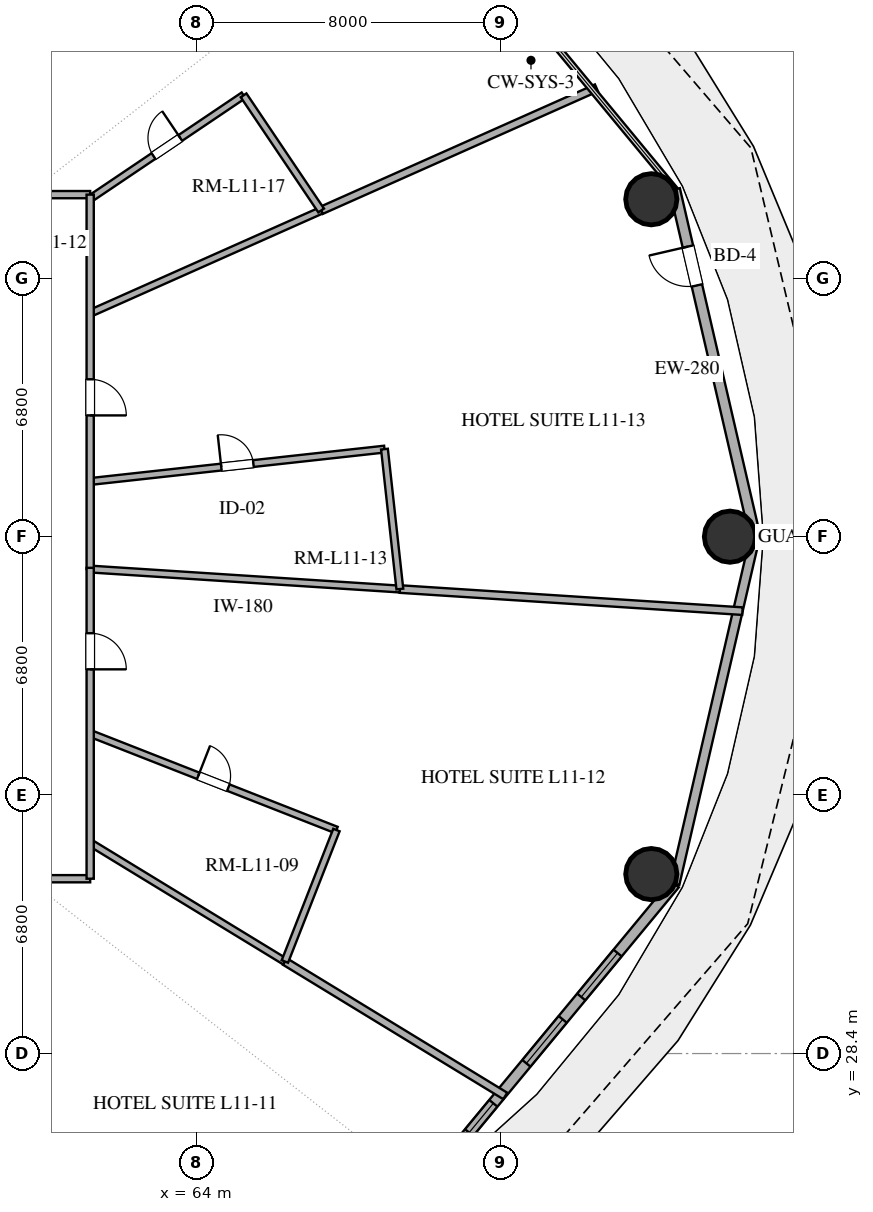
"""IFC4 building model, lengths in metres.
Left out: names, types, materials, properties, quantities, classifications, styles, units other than length and angle.
Written with IfcOpenShell. Run it as: python <this file> out.ifc"""

import sys

from ifc_helpers import new_model, si_unit, direction, frame, frame_2d, origin, origin_2d, place, context, subcontext, project, spatial, rectangle, hollow_circle, extrude, element, fill, save


model = new_model("IFC4")
c1 = context("Model", 3, precision=1e-05, world=origin(), true_north=direction((0.0, 1.0)))
c2 = subcontext(c1, "Body", "Model", "MODEL_VIEW")
j1 = project(units=[si_unit("LENGTHUNIT", "METRE"), si_unit("PLANEANGLEUNIT", "RADIAN")], contexts=[c1])
p1 = place(None, origin())
s1 = spatial("IfcSite", under=j1, at=p1, CompositionType="ELEMENT")
p2 = place(p1, origin())
s2 = spatial("IfcBuilding", under=s1, at=p2, CompositionType="ELEMENT")
p3 = place(p2, frame((0.0, 0.0, 49.8)))
s3 = spatial("IfcBuildingStorey", under=s2, at=p3, CompositionType="ELEMENT", Elevation=49.8)
for number, where, z_axis, x_axis in (
    (1, (78.035, 42.0, 0.0), (0.0, 0.0, 1.0), (1.0, 0.0, 0.0)),
    (2, (75.966, 50.878, 0.0), (0.0, 0.0, 1.0), (1.0, 0.0, 0.0)),
    (3, (75.966, 33.122, 0.0), (0.0, 0.0, 1.0), (1.0, 0.0, 0.0)),
):
    element("IfcColumn", number, at=place(p3, frame(where, z_axis=z_axis, x_axis=x_axis)), inside=s3, PredefinedType="COLUMN", context=c2, shape_type="SweptSolid", body=[
        extrude(hollow_circle(Radius=0.675, WallThickness=0.036, at=origin_2d()), origin(), (0.0, 0.0, 1.0), 3.38),
    ])
p4 = place(p3, frame((78.696, 42.0, 0.0), z_axis=(0.0, 0.0, 1.0), x_axis=(-0.225454452941, 0.974253709076, 0.0)))
e4 = element("IfcWall", 4, at=p4, inside=s3, PredefinedType="SOLIDWALL", context=c2, shape_type="SweptSolid", body=[
    extrude(rectangle(XDim=9.38, YDim=0.28, at=frame_2d((4.69, 0.0))), origin(), (0.0, 0.0, 1.0), 3.38),
])
p5 = place(p4, frame((6.785, 0.0, 0.0)))
e5 = element("IfcOpeningElement", 5, at=p5, cuts=e4, PredefinedType="OPENING", context=c2, shape_type="SweptSolid", body=[
    extrude(rectangle(XDim=1.05, YDim=2.2, at=frame_2d((0.525, 1.1))), frame((0.0, 0.15, 0.0), z_axis=(0.0, -1.0, 0.0), x_axis=(1.0, 0.0, 0.0)), (0.0, 0.0, 1.0), 0.3),
])
p6 = place(p3, frame((70.174, 25.114, 0.0), z_axis=(0.0, 0.0, 1.0), x_axis=(0.637296809613, 0.770618437657, 0.0)))
e6 = element("IfcWall", 6, at=p6, inside=s3, PredefinedType="SOLIDWALL", context=c2, shape_type="SweptSolid", body=[
    extrude(rectangle(XDim=10.053, YDim=0.28, at=frame_2d((5.027, 0.0))), origin(), (0.0, 0.0, 1.0), 3.38),
])
p7 = place(p6, frame((1.565, 0.0, 0.85)))
e7 = element("IfcOpeningElement", 7, at=p7, cuts=e6, PredefinedType="OPENING", context=c2, shape_type="SweptSolid", body=[
    extrude(rectangle(XDim=1.0, YDim=1.8, at=frame_2d((0.5, 0.9))), frame((0.0, 0.15, 0.0), z_axis=(0.0, -1.0, 0.0), x_axis=(1.0, 0.0, 0.0)), (0.0, 0.0, 1.0), 0.3),
])
p8 = place(p6, frame((3.93, 0.0, 0.85)))
e8 = element("IfcOpeningElement", 8, at=p8, cuts=e6, PredefinedType="OPENING", context=c2, shape_type="SweptSolid", body=[
    extrude(rectangle(XDim=1.5, YDim=2.0, at=frame_2d((0.75, 1.0))), frame((0.0, 0.15, 0.0), z_axis=(0.0, -1.0, 0.0), x_axis=(1.0, 0.0, 0.0)), (0.0, 0.0, 1.0), 0.3),
])
p9 = place(p6, frame((6.196, 0.0, 0.85)))
e9 = element("IfcOpeningElement", 9, at=p9, cuts=e6, PredefinedType="OPENING", context=c2, shape_type="SweptSolid", body=[
    extrude(rectangle(XDim=1.5, YDim=2.0, at=frame_2d((0.75, 1.0))), frame((0.0, 0.15, 0.0), z_axis=(0.0, -1.0, 0.0), x_axis=(1.0, 0.0, 0.0)), (0.0, 0.0, 1.0), 0.3),
])
p10 = place(p3, frame((76.581, 32.862, 0.0), z_axis=(0.0, 0.0, 1.0), x_axis=(0.225454452941, 0.974253709076, 0.0)))
e10 = element("IfcWall", 10, at=p10, inside=s3, PredefinedType="SOLIDWALL", context=c2, shape_type="SweptSolid", body=[
    extrude(rectangle(XDim=9.38, YDim=0.25, at=frame_2d((4.69, 0.0))), origin(), (0.0, 0.0, 1.0), 3.38),
])
p11 = place(p3, frame((63.96, 62.204, 0.0), z_axis=(0.0, 0.0, 1.0), x_axis=(-0.619889304847, -0.784689269543, 0.0)))
e11 = element("IfcWall", 11, at=p11, inside=s3, PredefinedType="PARTITIONING", context=c2, shape_type="SweptSolid", body=[
    extrude(rectangle(XDim=14.278, YDim=0.2, at=frame_2d((7.139, 0.0))), origin(), (0.0, 0.0, 1.0), 2.74),
])
p12 = place(p3, frame((78.364, 40.041, 0.0), z_axis=(0.0, 0.0, 1.0), x_axis=(-0.997924020497, 0.064402246198, 0.0)))
e12 = element("IfcWall", 12, at=p12, inside=s3, PredefinedType="PARTITIONING", context=c2, shape_type="SweptSolid", body=[
    extrude(rectangle(XDim=9.034, YDim=0.2, at=frame_2d((4.517, 0.0))), origin(), (0.0, 0.0, 1.0), 2.74),
])
p13 = place(p3, frame((69.349, 40.622, 0.0), z_axis=(0.0, 0.0, 1.0), x_axis=(-0.997924317455, 0.064397644621, 0.0)))
e13 = element("IfcWall", 13, at=p13, inside=s3, PredefinedType="PLUMBINGWALL", context=c2, shape_type="SweptSolid", body=[
    extrude(rectangle(XDim=8.166, YDim=0.18, at=frame_2d((4.083, 0.0))), origin(), (0.0, 0.0, 1.0), 2.74),
])
p14 = place(p3, frame((74.523, 53.809, 0.0), z_axis=(0.0, 0.0, 1.0), x_axis=(-0.913542208968, -0.40674393964, 0.0)))
e14 = element("IfcWall", 14, at=p14, inside=s3, PredefinedType="PARTITIONING", context=c2, shape_type="SweptSolid", body=[
    extrude(rectangle(XDim=7.93, YDim=0.2, at=frame_2d((3.965, 0.0))), origin(), (0.0, 0.0, 1.0), 2.74),
])
p15 = place(p3, frame((61.2, 43.452, 0.0), z_axis=(0.0, 0.0, 1.0), x_axis=(0.994005037085, 0.109334286708, 0.0)))
e15 = element("IfcWall", 15, at=p15, inside=s3, PredefinedType="PLUMBINGWALL", context=c2, shape_type="SweptSolid", body=[
    extrude(rectangle(XDim=7.791, YDim=0.18, at=frame_2d((3.896, 0.0))), origin(), (0.0, 0.0, 1.0), 2.74),
])
p16 = place(p15, frame((3.47, 0.0, 0.0)))
e16 = element("IfcOpeningElement", 16, at=p16, cuts=e15, PredefinedType="OPENING", context=c2, shape_type="SweptSolid", body=[
    extrude(rectangle(XDim=0.85, YDim=2.1, at=frame_2d((0.425, 1.05))), frame((0.0, 0.1, 0.0), z_axis=(0.0, -1.0, 0.0), x_axis=(1.0, 0.0, 0.0)), (0.0, 0.0, 1.0), 0.2),
])
p17 = place(p3, frame((61.01, 20.281, 0.0), z_axis=(0.0, 0.0, 1.0), x_axis=(-0.513892719639, 0.857854458928, 0.0)))
e17 = element("IfcWall", 17, at=p17, inside=s3, PredefinedType="PARTITIONING", context=c2, shape_type="SweptSolid", body=[
    extrude(rectangle(XDim=7.563, YDim=0.2, at=frame_2d((3.781, 0.0))), origin(), (0.0, 0.0, 1.0), 2.74),
])
p18 = place(p3, frame((61.2, 36.823, 0.0), z_axis=(0.0, 0.0, 1.0), x_axis=(0.930954264603, -0.365135806539, 0.0)))
e18 = element("IfcWall", 18, at=p18, inside=s3, PredefinedType="PLUMBINGWALL", context=c2, shape_type="SweptSolid", body=[
    extrude(rectangle(XDim=6.961, YDim=0.18, at=frame_2d((3.48, 0.0))), origin(), (0.0, 0.0, 1.0), 2.74),
])
p19 = place(p18, frame((3.055, 0.0, 0.0)))
e19 = element("IfcOpeningElement", 19, at=p19, cuts=e18, PredefinedType="OPENING", context=c2, shape_type="SweptSolid", body=[
    extrude(rectangle(XDim=0.85, YDim=2.1, at=frame_2d((0.425, 1.05))), frame((0.0, 0.1, 0.0), z_axis=(0.0, -1.0, 0.0), x_axis=(1.0, 0.0, 0.0)), (0.0, 0.0, 1.0), 0.2),
])
p20 = place(p3, frame((72.123, 27.284, 0.0), z_axis=(0.0, 0.0, 1.0), x_axis=(-0.853686673388, 0.520786965735, 0.0)))
e20 = element("IfcWall", 20, at=p20, inside=s3, PredefinedType="PARTITIONING", context=c2, shape_type="SweptSolid", body=[
    extrude(rectangle(XDim=6.793, YDim=0.2, at=frame_2d((3.396, 0.0))), origin(), (0.0, 0.0, 1.0), 2.74),
])
p21 = place(p3, frame((67.278, 50.583, 0.0), z_axis=(0.0, 0.0, 1.0), x_axis=(-0.913551093465, -0.406723984575, 0.0)))
e21 = element("IfcWall", 21, at=p21, inside=s3, PredefinedType="PLUMBINGWALL", context=c2, shape_type="SweptSolid", body=[
    extrude(rectangle(XDim=6.653, YDim=0.18, at=frame_2d((3.327, 0.0))), origin(), (0.0, 0.0, 1.0), 2.74),
])
p22 = place(p3, frame((43.369, 51.0, 0.0), z_axis=(0.0, 0.0, 1.0), x_axis=(1.0, 0.0, 0.0)))
e22 = element("IfcWall", 22, at=p22, inside=s3, PredefinedType="PARTITIONING", context=c2, shape_type="SweptSolid", body=[
    extrude(rectangle(XDim=17.831, YDim=0.19, at=frame_2d((8.916, 0.0))), origin(), (0.0, 0.0, 1.0), 2.74),
])
p23 = place(p22, frame((14.29, 0.0, 0.0)))
e23 = element("IfcOpeningElement", 23, at=p23, cuts=e22, PredefinedType="OPENING", context=c2, shape_type="SweptSolid", body=[
    extrude(rectangle(XDim=0.95, YDim=2.15, at=frame_2d((0.475, 1.075))), frame((0.0, 0.105, 0.0), z_axis=(0.0, -1.0, 0.0), x_axis=(1.0, 0.0, 0.0)), (0.0, 0.0, 1.0), 0.21),
])
p24 = place(p22, frame((8.533, 0.0, 0.0)))
e24 = element("IfcOpeningElement", 24, at=p24, cuts=e22, PredefinedType="OPENING", context=c2, shape_type="SweptSolid", body=[
    extrude(rectangle(XDim=1.0, YDim=2.2, at=frame_2d((0.5, 1.1))), frame((0.0, 0.105, 0.0), z_axis=(0.0, -1.0, 0.0), x_axis=(1.0, 0.0, 0.0)), (0.0, 0.0, 1.0), 0.21),
])
p25 = place(p22, frame((3.591, 0.0, 0.0)))
e25 = element("IfcOpeningElement", 25, at=p25, cuts=e22, PredefinedType="OPENING", context=c2, shape_type="SweptSolid", body=[
    extrude(rectangle(XDim=1.0, YDim=2.2, at=frame_2d((0.5, 1.1))), frame((0.0, 0.105, 0.0), z_axis=(0.0, -1.0, 0.0), x_axis=(1.0, 0.0, 0.0)), (0.0, 0.0, 1.0), 0.21),
])
p26 = place(p3, frame((66.323, 30.822, 0.0), z_axis=(0.0, 0.0, 1.0), x_axis=(-0.853693843866, 0.52077521153, 0.0)))
e26 = element("IfcWall", 26, at=p26, inside=s3, PredefinedType="PLUMBINGWALL", context=c2, shape_type="SweptSolid", body=[
    extrude(rectangle(XDim=6.002, YDim=0.18, at=frame_2d((3.001, 0.0))), origin(), (0.0, 0.0, 1.0), 2.74),
])
p27 = place(p3, frame((61.2, 33.0, 0.0), z_axis=(0.0, 0.0, 1.0), x_axis=(-1.0, 0.0, 0.0)))
e27 = element("IfcWall", 27, at=p27, inside=s3, PredefinedType="PARTITIONING", context=c2, shape_type="SweptSolid", body=[
    extrude(rectangle(XDim=7.846, YDim=0.19, at=frame_2d((3.923, 0.0))), origin(), (0.0, 0.0, 1.0), 2.74),
])
p28 = place(p27, frame((2.249, 0.0, 0.0)))
e28 = element("IfcOpeningElement", 28, at=p28, cuts=e27, PredefinedType="OPENING", context=c2, shape_type="SweptSolid", body=[
    extrude(rectangle(XDim=0.95, YDim=2.15, at=frame_2d((0.475, 1.075))), frame((0.0, 0.105, 0.0), z_axis=(0.0, -1.0, 0.0), x_axis=(1.0, 0.0, 0.0)), (0.0, 0.0, 1.0), 0.21),
])
p29 = place(p3, frame((61.2, 50.893, 0.0), z_axis=(0.0, 0.0, 1.0), x_axis=(0.829362933151, 0.558710233587, 0.0)))
e29 = element("IfcWall", 29, at=p29, inside=s3, PredefinedType="PLUMBINGWALL", context=c2, shape_type="SweptSolid", body=[
    extrude(rectangle(XDim=4.867, YDim=0.18, at=frame_2d((2.434, 0.0))), origin(), (0.0, 0.0, 1.0), 2.74),
])
p30 = place(p29, frame((2.009, 0.0, 0.0)))
e30 = element("IfcOpeningElement", 30, at=p30, cuts=e29, PredefinedType="OPENING", context=c2, shape_type="SweptSolid", body=[
    extrude(rectangle(XDim=0.85, YDim=2.1, at=frame_2d((0.425, 1.05))), frame((0.0, 0.1, 0.0), z_axis=(0.0, -1.0, 0.0), x_axis=(1.0, 0.0, 0.0)), (0.0, 0.0, 1.0), 0.2),
])
p31 = place(p3, frame((61.2, 51.0, 0.0), z_axis=(0.0, 0.0, 1.0), x_axis=(0.0, -1.0, 0.0)))
e31 = element("IfcWall", 31, at=p31, inside=s3, PredefinedType="PARTITIONING", context=c2, shape_type="SweptSolid", body=[
    extrude(rectangle(XDim=9.852, YDim=0.19, at=frame_2d((4.926, 0.0))), origin(), (0.0, 0.0, 1.0), 2.74),
])
p32 = place(p31, frame((4.859, 0.0, 0.0)))
e32 = element("IfcOpeningElement", 32, at=p32, cuts=e31, PredefinedType="OPENING", context=c2, shape_type="SweptSolid", body=[
    extrude(rectangle(XDim=0.95, YDim=2.15, at=frame_2d((0.475, 1.075))), frame((0.0, 0.105, 0.0), z_axis=(0.0, -1.0, 0.0), x_axis=(1.0, 0.0, 0.0)), (0.0, 0.0, 1.0), 0.21),
])
p33 = place(p3, frame((61.2, 41.18, 0.0), z_axis=(0.0, 0.0, 1.0), x_axis=(0.0, -1.0, 0.0)))
e33 = element("IfcWall", 33, at=p33, inside=s3, PredefinedType="PARTITIONING", context=c2, shape_type="SweptSolid", body=[
    extrude(rectangle(XDim=8.18, YDim=0.19, at=frame_2d((4.09, 0.0))), origin(), (0.0, 0.0, 1.0), 2.74),
])
p34 = place(p33, frame((1.721, 0.0, 0.0)))
e34 = element("IfcOpeningElement", 34, at=p34, cuts=e33, PredefinedType="OPENING", context=c2, shape_type="SweptSolid", body=[
    extrude(rectangle(XDim=0.95, YDim=2.15, at=frame_2d((0.475, 1.075))), frame((0.0, 0.105, 0.0), z_axis=(0.0, -1.0, 0.0), x_axis=(1.0, 0.0, 0.0)), (0.0, 0.0, 1.0), 0.21),
])
p35 = place(p3, frame((67.68, 34.281, 0.0), z_axis=(0.0, 0.0, 1.0), x_axis=(-0.365174619735, -0.930939040486, 0.0)))
e35 = element("IfcWall", 35, at=p35, inside=s3, PredefinedType="PLUMBINGWALL", context=c2, shape_type="SweptSolid", body=[
    extrude(rectangle(XDim=3.716, YDim=0.18, at=frame_2d((1.858, 0.0))), origin(), (0.0, 0.0, 1.0), 2.74),
])
p36 = place(p3, frame((68.944, 44.304, 0.0), z_axis=(0.0, 0.0, 1.0), x_axis=(0.109360669908, -0.994002134745, 0.0)))
e36 = element("IfcWall", 36, at=p36, inside=s3, PredefinedType="PLUMBINGWALL", context=c2, shape_type="SweptSolid", body=[
    extrude(rectangle(XDim=3.704, YDim=0.18, at=frame_2d((1.852, 0.0))), origin(), (0.0, 0.0, 1.0), 2.74),
])
p37 = place(p3, frame((65.237, 53.613, 0.0), z_axis=(0.0, 0.0, 1.0), x_axis=(0.558749555988, -0.829336441791, 0.0)))
e37 = element("IfcWall", 37, at=p37, inside=s3, PredefinedType="PLUMBINGWALL", context=c2, shape_type="SweptSolid", body=[
    extrude(rectangle(XDim=3.653, YDim=0.18, at=frame_2d((1.827, 0.0))), origin(), (0.0, 0.0, 1.0), 2.74),
])
p38 = place(p5, origin())
e38 = element("IfcDoor", 38, at=p38, inside=s3, OperationType="SINGLE_SWING_RIGHT", PredefinedType="DOOR", context=c2, shape_type="SweptSolid", body=[
    extrude(rectangle(XDim=1.05, YDim=2.2, at=frame_2d((0.525, 1.1))), frame((0.0, 0.025, 0.0), z_axis=(0.0, -1.0, 0.0), x_axis=(1.0, 0.0, 0.0)), (0.0, 0.0, 1.0), 0.05),
])
fill(e5, e38)
p39 = place(p7, origin())
e39 = element("IfcWindow", 39, at=p39, inside=s3, PartitioningType="SINGLE_PANEL", PredefinedType="WINDOW", context=c2, shape_type="SweptSolid", body=[
    extrude(rectangle(XDim=1.0, YDim=1.8, at=frame_2d((0.5, 0.9))), frame((0.0, 0.03, 0.0), z_axis=(0.0, -1.0, 0.0), x_axis=(1.0, 0.0, 0.0)), (0.0, 0.0, 1.0), 0.06),
])
fill(e7, e39)
p40 = place(p8, origin())
e40 = element("IfcWindow", 40, at=p40, inside=s3, PartitioningType="SINGLE_PANEL", PredefinedType="WINDOW", context=c2, shape_type="SweptSolid", body=[
    extrude(rectangle(XDim=1.5, YDim=2.0, at=frame_2d((0.75, 1.0))), frame((0.0, 0.03, 0.0), z_axis=(0.0, -1.0, 0.0), x_axis=(1.0, 0.0, 0.0)), (0.0, 0.0, 1.0), 0.06),
])
fill(e8, e40)
p41 = place(p9, origin())
e41 = element("IfcWindow", 41, at=p41, inside=s3, PartitioningType="SINGLE_PANEL", PredefinedType="WINDOW", context=c2, shape_type="SweptSolid", body=[
    extrude(rectangle(XDim=1.5, YDim=2.0, at=frame_2d((0.75, 1.0))), frame((0.0, 0.03, 0.0), z_axis=(0.0, -1.0, 0.0), x_axis=(1.0, 0.0, 0.0)), (0.0, 0.0, 1.0), 0.06),
])
fill(e9, e41)
p42 = place(p16, origin())
e42 = element("IfcDoor", 42, at=p42, inside=s3, OperationType="SINGLE_SWING_LEFT", PredefinedType="DOOR", context=c2, shape_type="SweptSolid", body=[
    extrude(rectangle(XDim=0.85, YDim=2.1, at=frame_2d((0.425, 1.05))), frame((0.0, 0.025, 0.0), z_axis=(0.0, -1.0, 0.0), x_axis=(1.0, 0.0, 0.0)), (0.0, 0.0, 1.0), 0.05),
])
fill(e16, e42)
p43 = place(p19, origin())
e43 = element("IfcDoor", 43, at=p43, inside=s3, OperationType="SINGLE_SWING_LEFT", PredefinedType="DOOR", context=c2, shape_type="SweptSolid", body=[
    extrude(rectangle(XDim=0.85, YDim=2.1, at=frame_2d((0.425, 1.05))), frame((0.0, 0.025, 0.0), z_axis=(0.0, -1.0, 0.0), x_axis=(1.0, 0.0, 0.0)), (0.0, 0.0, 1.0), 0.05),
])
fill(e19, e43)
p44 = place(p30, origin())
e44 = element("IfcDoor", 44, at=p44, inside=s3, OperationType="SINGLE_SWING_RIGHT", PredefinedType="DOOR", context=c2, shape_type="SweptSolid", body=[
    extrude(rectangle(XDim=0.85, YDim=2.1, at=frame_2d((0.425, 1.05))), frame((0.0, 0.025, 0.0), z_axis=(0.0, -1.0, 0.0), x_axis=(1.0, 0.0, 0.0)), (0.0, 0.0, 1.0), 0.05),
])
fill(e30, e44)
p45 = place(p32, origin())
e45 = element("IfcDoor", 45, at=p45, inside=s3, OperationType="SINGLE_SWING_RIGHT", PredefinedType="DOOR", context=c2, shape_type="SweptSolid", body=[
    extrude(rectangle(XDim=0.95, YDim=2.15, at=frame_2d((0.475, 1.075))), frame((0.0, 0.025, 0.0), z_axis=(0.0, -1.0, 0.0), x_axis=(1.0, 0.0, 0.0)), (0.0, 0.0, 1.0), 0.05),
])
fill(e32, e45)
p46 = place(p34, origin())
e46 = element("IfcDoor", 46, at=p46, inside=s3, OperationType="SINGLE_SWING_RIGHT", PredefinedType="DOOR", context=c2, shape_type="SweptSolid", body=[
    extrude(rectangle(XDim=0.95, YDim=2.15, at=frame_2d((0.475, 1.075))), frame((0.0, 0.025, 0.0), z_axis=(0.0, -1.0, 0.0), x_axis=(1.0, 0.0, 0.0)), (0.0, 0.0, 1.0), 0.05),
])
fill(e34, e46)
save(model, sys.argv[1])
